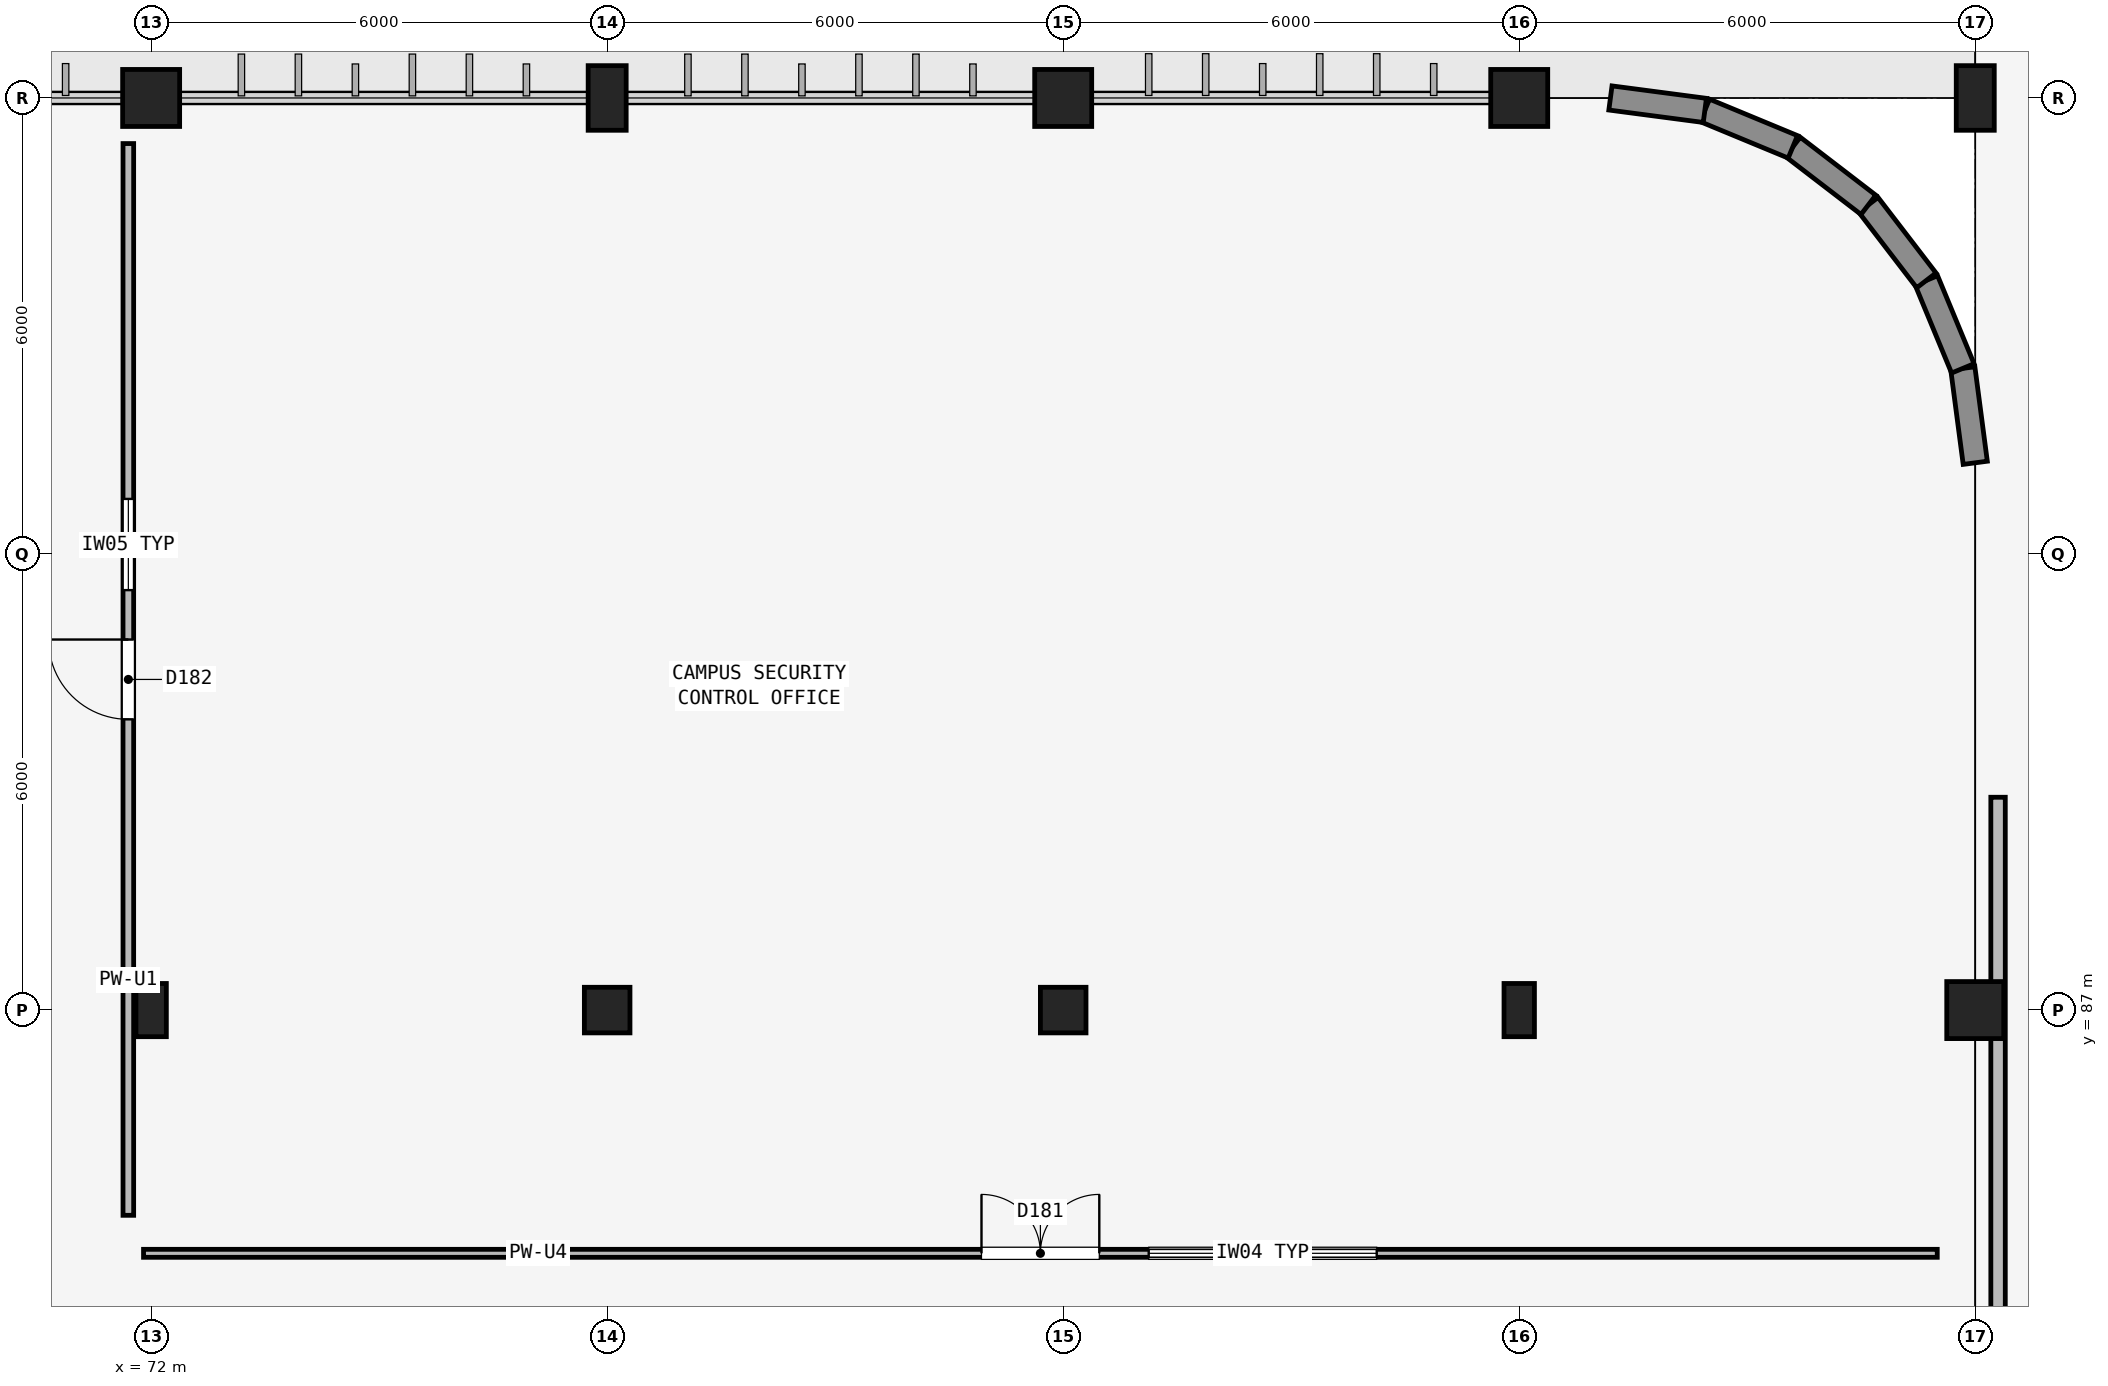
"""IFC4 building model, lengths in metres.
Left out: names, types, materials, properties, quantities, classifications, styles, units other than length and angle.
Written with IfcOpenShell. Run it as: python <this file> out.ifc"""

import sys

from ifc_helpers import new_model, si_unit, direction, frame, frame_2d, origin, origin_2d, place, context, subcontext, project, spatial, rectangle, extrude, element, fill, save


model = new_model("IFC4")
c1 = context("Model", 3, precision=1e-05, world=origin(), true_north=direction((0.0, 1.0)))
c2 = subcontext(c1, "Body", "Model", "MODEL_VIEW")
j1 = project(units=[si_unit("LENGTHUNIT", "METRE"), si_unit("PLANEANGLEUNIT", "RADIAN")], contexts=[c1])
p1 = place(None, origin())
s1 = spatial("IfcSite", under=j1, at=p1, CompositionType="ELEMENT")
p2 = place(p1, origin())
s2 = spatial("IfcBuilding", under=s1, at=p2, CompositionType="ELEMENT")
p3 = place(p2, origin())
s3 = spatial("IfcBuildingStorey", under=s2, at=p3, CompositionType="ELEMENT", Elevation=0.0)
p4 = place(p3, frame((72.0, 87.0, 0.0), z_axis=(0.0, 0.0, 1.0), x_axis=(1.0, 0.0, 0.0)))
e1 = element("IfcColumn", 1, at=p4, inside=s3, PredefinedType="COLUMN", context=c2, shape_type="SweptSolid", body=[
    extrude(rectangle(XDim=0.4, YDim=0.7, at=origin_2d()), origin(), (0.0, 0.0, 1.0), 4.8),
])
p5 = place(p3, frame((72.0, 99.0, 0.0), z_axis=(0.0, 0.0, 1.0), x_axis=(1.0, 0.0, 0.0)))
e2 = element("IfcColumn", 2, at=p5, inside=s3, PredefinedType="COLUMN", context=c2, shape_type="SweptSolid", body=[
    extrude(rectangle(XDim=0.75, YDim=0.75, at=origin_2d()), origin(), (0.0, 0.0, 1.0), 4.8),
])
p6 = place(p3, frame((78.0, 87.0, 0.0), z_axis=(0.0, 0.0, 1.0), x_axis=(1.0, 0.0, 0.0)))
e3 = element("IfcColumn", 3, at=p6, inside=s3, PredefinedType="COLUMN", context=c2, shape_type="SweptSolid", body=[
    extrude(rectangle(XDim=0.6, YDim=0.6, at=origin_2d()), origin(), (0.0, 0.0, 1.0), 4.8),
])
p7 = place(p3, frame((78.0, 99.0, 0.0), z_axis=(0.0, 0.0, 1.0), x_axis=(1.0, 0.0, 0.0)))
e4 = element("IfcColumn", 4, at=p7, inside=s3, PredefinedType="COLUMN", context=c2, shape_type="SweptSolid", body=[
    extrude(rectangle(XDim=0.5, YDim=0.85, at=origin_2d()), origin(), (0.0, 0.0, 1.0), 4.8),
])
p8 = place(p3, frame((84.0, 87.0, 0.0), z_axis=(0.0, 0.0, 1.0), x_axis=(1.0, 0.0, 0.0)))
e5 = element("IfcColumn", 5, at=p8, inside=s3, PredefinedType="COLUMN", context=c2, shape_type="SweptSolid", body=[
    extrude(rectangle(XDim=0.6, YDim=0.6, at=origin_2d()), origin(), (0.0, 0.0, 1.0), 4.8),
])
p9 = place(p3, frame((84.0, 99.0, 0.0), z_axis=(0.0, 0.0, 1.0), x_axis=(1.0, 0.0, 0.0)))
e6 = element("IfcColumn", 6, at=p9, inside=s3, PredefinedType="COLUMN", context=c2, shape_type="SweptSolid", body=[
    extrude(rectangle(XDim=0.75, YDim=0.75, at=origin_2d()), origin(), (0.0, 0.0, 1.0), 4.8),
])
p10 = place(p3, frame((90.0, 87.0, 0.0), z_axis=(0.0, 0.0, 1.0), x_axis=(1.0, 0.0, 0.0)))
e7 = element("IfcColumn", 7, at=p10, inside=s3, PredefinedType="COLUMN", context=c2, shape_type="SweptSolid", body=[
    extrude(rectangle(XDim=0.4, YDim=0.7, at=origin_2d()), origin(), (0.0, 0.0, 1.0), 4.8),
])
for number, where, z_axis, x_axis in (
    (8, (90.0, 99.0, 0.0), (0.0, 0.0, 1.0), (1.0, 0.0, 0.0)),
    (9, (96.0, 87.0, 0.0), (0.0, 0.0, 1.0), (1.0, 0.0, 0.0)),
):
    element("IfcColumn", number, at=place(p3, frame(where, z_axis=z_axis, x_axis=x_axis)), inside=s3, PredefinedType="COLUMN", context=c2, shape_type="SweptSolid", body=[
        extrude(rectangle(XDim=0.75, YDim=0.75, at=origin_2d()), origin(), (0.0, 0.0, 1.0), 4.8),
    ])
p11 = place(p3, frame((96.0, 99.0, 0.0), z_axis=(0.0, 0.0, 1.0), x_axis=(1.0, 0.0, 0.0)))
e10 = element("IfcColumn", 10, at=p11, inside=s3, PredefinedType="COLUMN", context=c2, shape_type="SweptSolid", body=[
    extrude(rectangle(XDim=0.5, YDim=0.85, at=origin_2d()), origin(), (0.0, 0.0, 1.0), 4.8),
])
for number, where, z_axis, x_axis in (
    (11, (96.0, 94.2, 0.0), (0.0, 0.0, 1.0), (-0.131, 0.991, 0.0)),
    (12, (95.836, 95.442, 0.0), (0.0, 0.0, 1.0), (-0.383, 0.924, 0.0)),
):
    element("IfcWall", number, at=place(p3, frame(where, z_axis=z_axis, x_axis=x_axis)), inside=s3, PredefinedType="SOLIDWALL", context=c2, shape_type="SweptSolid", body=[
        extrude(rectangle(XDim=1.253, YDim=0.32, at=frame_2d((0.626, 0.0))), origin(), (0.0, 0.0, 1.0), 3.69),
    ])
for number, where, z_axis, x_axis in (
    (13, (95.357, 96.6, 0.0), (0.0, 0.0, 1.0), (-0.609, 0.793, 0.0)),
    (14, (94.594, 97.594, 0.0), (0.0, 0.0, 1.0), (-0.793, 0.609, 0.0)),
):
    element("IfcWall", number, at=place(p3, frame(where, z_axis=z_axis, x_axis=x_axis)), inside=s3, PredefinedType="SOLIDWALL", context=c2, shape_type="SweptSolid", body=[
        extrude(rectangle(XDim=1.253, YDim=0.32, at=frame_2d((0.626, 0.0))), origin(), (0.0, 0.0, 1.0), 4.495),
    ])
for number, where, z_axis, x_axis in (
    (15, (93.6, 98.357, 0.0), (0.0, 0.0, 1.0), (-0.924, 0.383, 0.0)),
    (16, (92.442, 98.836, 0.0), (0.0, 0.0, 1.0), (-0.991, 0.131, 0.0)),
):
    element("IfcWall", number, at=place(p3, frame(where, z_axis=z_axis, x_axis=x_axis)), inside=s3, PredefinedType="SOLIDWALL", context=c2, shape_type="SweptSolid", body=[
        extrude(rectangle(XDim=1.253, YDim=0.32, at=frame_2d((0.626, 0.0))), origin(), (0.0, 0.0, 1.0), 4.19),
    ])
p12 = place(p3, frame((71.9, 83.8, 0.0), z_axis=(0.0, 0.0, 1.0), x_axis=(1.0, 0.0, 0.0)))
e17 = element("IfcWall", 17, at=p12, inside=s3, PredefinedType="PARTITIONING", context=c2, shape_type="SweptSolid", body=[
    extrude(rectangle(XDim=23.6, YDim=0.105, at=frame_2d((11.8, 0.0))), origin(), (0.0, 0.0, 1.0), 4.09),
])
p13 = place(p12, frame((11.025, 0.0, 0.0)))
e18 = element("IfcOpeningElement", 18, at=p13, cuts=e17, PredefinedType="OPENING", context=c2, shape_type="SweptSolid", body=[
    extrude(rectangle(XDim=1.55, YDim=2.2, at=frame_2d((0.775, 1.1))), frame((0.0, 0.062, 0.0), z_axis=(0.0, -1.0, 0.0), x_axis=(1.0, 0.0, 0.0)), (0.0, 0.0, 1.0), 0.125),
])
p14 = place(p12, frame((13.225, 0.0, 0.95)))
e19 = element("IfcOpeningElement", 19, at=p14, cuts=e17, PredefinedType="OPENING", context=c2, shape_type="SweptSolid", body=[
    extrude(rectangle(XDim=3.0, YDim=1.3, at=frame_2d((1.5, 0.65))), frame((0.0, 0.062, 0.0), z_axis=(0.0, -1.0, 0.0), x_axis=(1.0, 0.0, 0.0)), (0.0, 0.0, 1.0), 0.125),
])
p15 = place(p3, frame((71.7, 84.3, 0.0), z_axis=(0.0, 0.0, 1.0), x_axis=(0.0, 1.0, 0.0)))
e20 = element("IfcWall", 20, at=p15, inside=s3, PredefinedType="PARTITIONING", context=c2, shape_type="SweptSolid", body=[
    extrude(rectangle(XDim=14.1, YDim=0.14, at=frame_2d((7.05, 0.0))), origin(), (0.0, 0.0, 1.0), 3.89),
])
p16 = place(p15, frame((6.525, 0.0, 0.0)))
e21 = element("IfcOpeningElement", 21, at=p16, cuts=e20, PredefinedType="OPENING", context=c2, shape_type="SweptSolid", body=[
    extrude(rectangle(XDim=1.05, YDim=2.2, at=frame_2d((0.525, 1.1))), frame((0.0, 0.08, 0.0), z_axis=(0.0, -1.0, 0.0), x_axis=(1.0, 0.0, 0.0)), (0.0, 0.0, 1.0), 0.16),
])
p17 = place(p15, frame((8.225, 0.0, 1.15)))
e22 = element("IfcOpeningElement", 22, at=p17, cuts=e20, PredefinedType="OPENING", context=c2, shape_type="SweptSolid", body=[
    extrude(rectangle(XDim=1.2, YDim=0.9, at=frame_2d((0.6, 0.45))), frame((0.0, 0.08, 0.0), z_axis=(0.0, -1.0, 0.0), x_axis=(1.0, 0.0, 0.0)), (0.0, 0.0, 1.0), 0.16),
])
p18 = place(p3, frame((96.3, 69.5, 0.0), z_axis=(0.0, 0.0, 1.0), x_axis=(0.0, 1.0, 0.0)))
e23 = element("IfcWall", 23, at=p18, inside=s3, PredefinedType="PARTITIONING", context=c2, shape_type="SweptSolid", body=[
    extrude(rectangle(XDim=20.3, YDim=0.19, at=frame_2d((10.15, 0.0))), origin(), (0.0, 0.0, 1.0), 3.69),
])
p19 = place(p18, frame((9.675, 0.0, 0.0)))
e24 = element("IfcOpeningElement", 24, at=p19, cuts=e23, PredefinedType="OPENING", context=c2, shape_type="SweptSolid", body=[
    extrude(rectangle(XDim=0.95, YDim=2.1, at=frame_2d((0.475, 1.05))), frame((0.0, 0.105, 0.0), z_axis=(0.0, -1.0, 0.0), x_axis=(1.0, 0.0, 0.0)), (0.0, 0.0, 1.0), 0.21),
])
p20 = place(p13, origin())
e25 = element("IfcDoor", 25, at=p20, inside=s3, OperationType="DOUBLE_DOOR_SINGLE_SWING", PredefinedType="DOOR", context=c2, shape_type="SweptSolid", body=[
    extrude(rectangle(XDim=1.55, YDim=2.2, at=frame_2d((0.775, 1.1))), frame((0.0, 0.025, 0.0), z_axis=(0.0, -1.0, 0.0), x_axis=(1.0, 0.0, 0.0)), (0.0, 0.0, 1.0), 0.05),
])
fill(e18, e25)
p21 = place(p14, origin())
e26 = element("IfcWindow", 26, at=p21, inside=s3, PartitioningType="SINGLE_PANEL", PredefinedType="WINDOW", context=c2, shape_type="SweptSolid", body=[
    extrude(rectangle(XDim=3.0, YDim=1.3, at=frame_2d((1.5, 0.65))), frame((0.0, 0.03, 0.0), z_axis=(0.0, -1.0, 0.0), x_axis=(1.0, 0.0, 0.0)), (0.0, 0.0, 1.0), 0.06),
])
fill(e19, e26)
p22 = place(p16, origin())
e27 = element("IfcDoor", 27, at=p22, inside=s3, OperationType="SINGLE_SWING_RIGHT", PredefinedType="DOOR", context=c2, shape_type="SweptSolid", body=[
    extrude(rectangle(XDim=1.05, YDim=2.2, at=frame_2d((0.525, 1.1))), frame((0.0, 0.025, 0.0), z_axis=(0.0, -1.0, 0.0), x_axis=(1.0, 0.0, 0.0)), (0.0, 0.0, 1.0), 0.05),
])
fill(e21, e27)
p23 = place(p17, origin())
e28 = element("IfcWindow", 28, at=p23, inside=s3, PartitioningType="SINGLE_PANEL", PredefinedType="WINDOW", context=c2, shape_type="SweptSolid", body=[
    extrude(rectangle(XDim=1.2, YDim=0.9, at=frame_2d((0.6, 0.45))), frame((0.0, 0.03, 0.0), z_axis=(0.0, -1.0, 0.0), x_axis=(1.0, 0.0, 0.0)), (0.0, 0.0, 1.0), 0.06),
])
fill(e22, e28)
save(model, sys.argv[1])
